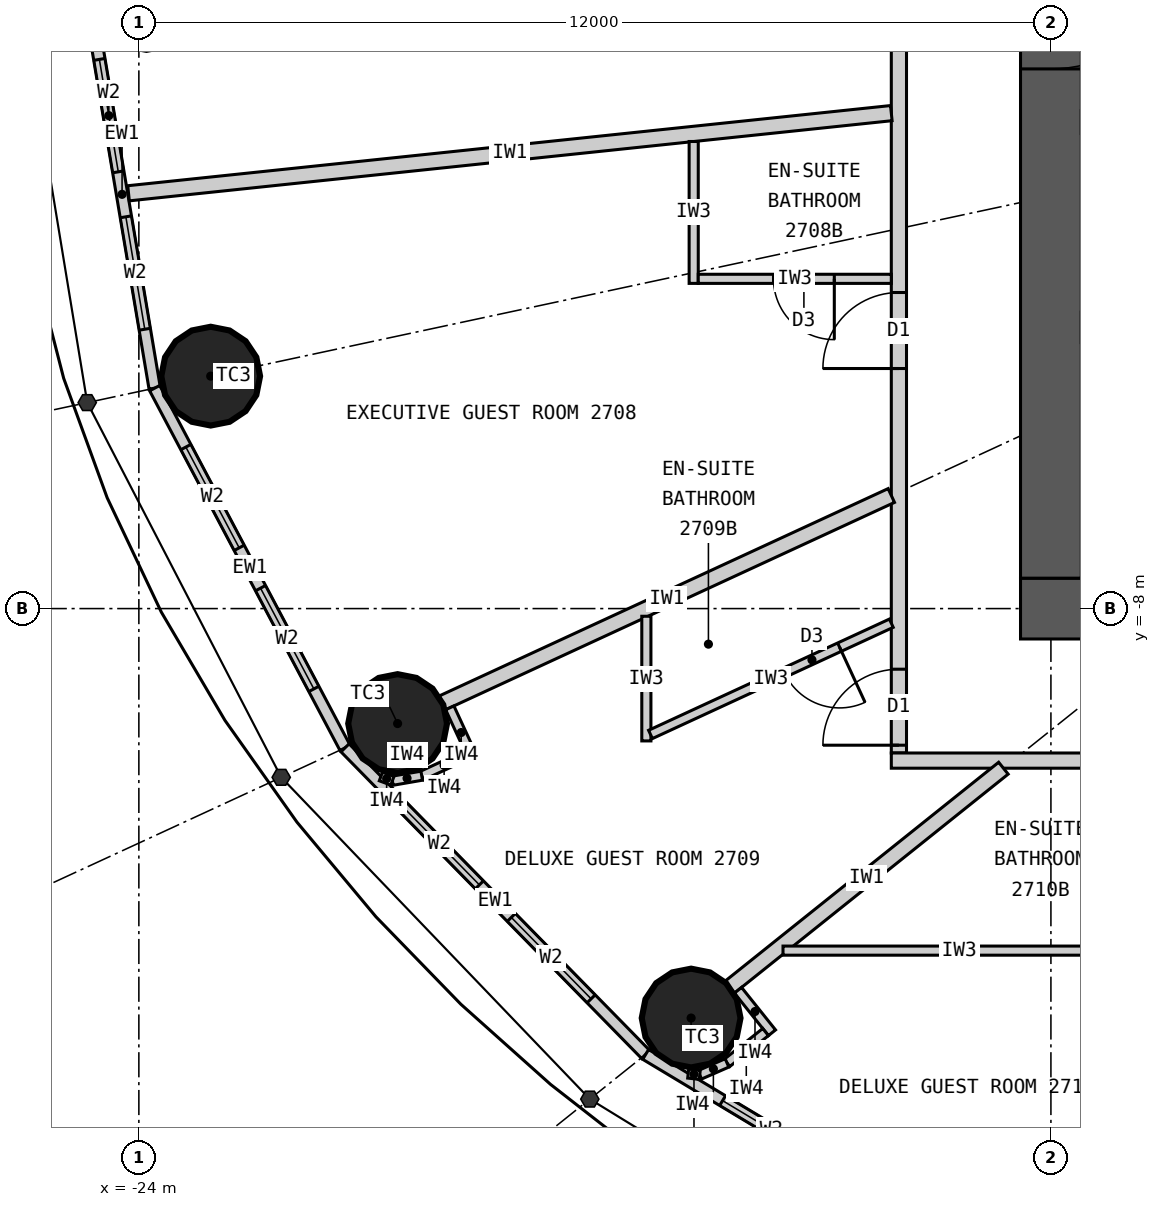
"""IFC4 building model, lengths in metres.
Left out: names, types, materials, properties, quantities, classifications, styles, units other than length and angle.
Written with IfcOpenShell. Run it as: python <this file> out.ifc"""

import sys

from ifc_helpers import new_model, si_unit, direction, frame, frame_2d, origin, origin_2d, place, context, subcontext, project, spatial, rectangle, circle, extrude, element, fill, save


model = new_model("IFC4")
c1 = context("Model", 3, precision=1e-05, world=origin(), true_north=direction((0.0, 1.0)))
c2 = subcontext(c1, "Body", "Model", "MODEL_VIEW")
j1 = project(units=[si_unit("LENGTHUNIT", "METRE"), si_unit("PLANEANGLEUNIT", "RADIAN")], contexts=[c1])
p1 = place(None, origin())
s1 = spatial("IfcSite", under=j1, at=p1, CompositionType="ELEMENT")
p2 = place(p1, origin())
s2 = spatial("IfcBuilding", under=s1, at=p2, CompositionType="ELEMENT")
p3 = place(p2, frame((0.0, 0.0, 108.9)))
s3 = spatial("IfcBuildingStorey", under=s2, at=p3, CompositionType="ELEMENT", Elevation=108.9)
for number, where, z_axis, x_axis in (
    (1, (-23.055, -4.942, 0.0), (0.0, 0.0, 1.0), (1.0, 0.0, 0.0)),
    (2, (-20.596, -9.513, 0.0), (0.0, 0.0, 1.0), (1.0, 0.0, 0.0)),
    (3, (-16.734, -13.387, 0.0), (0.0, 0.0, 1.0), (1.0, 0.0, 0.0)),
):
    element("IfcColumn", number, at=place(p3, frame(where, z_axis=z_axis, x_axis=x_axis)), inside=s3, PredefinedType="COLUMN", context=c2, shape_type="SweptSolid", body=[
        extrude(circle(Radius=0.65, at=origin_2d()), origin(), (0.0, 0.0, 1.0), 3.3),
    ])
p4 = place(p3, frame((12.4, -8.0, 0.0), z_axis=(0.0, 0.0, 1.0), x_axis=(-1.0, 0.0, 0.0)))
e4 = element("IfcWall", 4, at=p4, inside=s3, PredefinedType="SHEAR", context=c2, shape_type="SweptSolid", body=[
    extrude(rectangle(XDim=24.8, YDim=0.8, at=frame_2d((12.4, 0.0))), origin(), (0.0, 0.0, 1.0), 3.3),
])
p5 = place(p4, frame((11.1, 0.0, 0.0)))
e5 = element("IfcOpeningElement", 5, at=p5, cuts=e4, PredefinedType="OPENING", context=c2, shape_type="SweptSolid", body=[
    extrude(rectangle(XDim=1.2, YDim=2.2, at=frame_2d((0.6, 1.1))), frame((0.0, 0.41, 0.0), z_axis=(0.0, -1.0, 0.0), x_axis=(1.0, 0.0, 0.0)), (0.0, 0.0, 1.0), 0.82),
])
p6 = place(p4, frame((18.7, 0.0, 0.0)))
e6 = element("IfcOpeningElement", 6, at=p6, cuts=e4, PredefinedType="OPENING", context=c2, shape_type="SweptSolid", body=[
    extrude(rectangle(XDim=0.9, YDim=2.2, at=frame_2d((0.45, 1.1))), frame((0.0, 0.41, 0.0), z_axis=(0.0, -1.0, 0.0), x_axis=(1.0, 0.0, 0.0)), (0.0, 0.0, 1.0), 0.82),
])
p7 = place(p3, frame((-12.0, 7.6, 0.0), z_axis=(0.0, 0.0, 1.0), x_axis=(0.0, -1.0, 0.0)))
e7 = element("IfcWall", 7, at=p7, inside=s3, PredefinedType="SHEAR", context=c2, shape_type="SweptSolid", body=[
    extrude(rectangle(XDim=15.2, YDim=0.8, at=frame_2d((7.6, 0.0))), origin(), (0.0, 0.0, 1.0), 3.3),
])
p8 = place(p7, frame((6.7, 0.0, 0.0)))
e8 = element("IfcOpeningElement", 8, at=p8, cuts=e7, PredefinedType="OPENING", context=c2, shape_type="SweptSolid", body=[
    extrude(rectangle(XDim=1.8, YDim=2.2, at=frame_2d((0.9, 1.1))), frame((0.0, 0.41, 0.0), z_axis=(0.0, -1.0, 0.0), x_axis=(1.0, 0.0, 0.0)), (0.0, 0.0, 1.0), 0.82),
])
p9 = place(p3, frame((-24.65, 0.0, 0.0), z_axis=(0.0, 0.0, 1.0), x_axis=(0.165883894218, -0.986145290329, 0.0)))
e9 = element("IfcWall", 9, at=p9, inside=s3, PredefinedType="ELEMENTEDWALL", context=c2, shape_type="SweptSolid", body=[
    extrude(rectangle(XDim=5.172, YDim=0.15, at=frame_2d((2.586, 0.0))), origin(), (0.0, 0.0, 1.0), 3.12),
])
p10 = place(p9, frame((0.786, 0.0, 0.9)))
e10 = element("IfcOpeningElement", 10, at=p10, cuts=e9, PredefinedType="OPENING", context=c2, shape_type="SweptSolid", body=[
    extrude(rectangle(XDim=1.5, YDim=1.9, at=frame_2d((0.75, 0.95))), frame((0.0, 0.085, 0.0), z_axis=(0.0, -1.0, 0.0), x_axis=(1.0, 0.0, 0.0)), (0.0, 0.0, 1.0), 0.17),
])
p11 = place(p9, frame((2.886, 0.0, 0.9)))
e11 = element("IfcOpeningElement", 11, at=p11, cuts=e9, PredefinedType="OPENING", context=c2, shape_type="SweptSolid", body=[
    extrude(rectangle(XDim=1.5, YDim=1.9, at=frame_2d((0.75, 0.95))), frame((0.0, 0.085, 0.0), z_axis=(0.0, -1.0, 0.0), x_axis=(1.0, 0.0, 0.0)), (0.0, 0.0, 1.0), 0.17),
])
p12 = place(p3, frame((-23.792, -5.1, 0.0), z_axis=(0.0, 0.0, 1.0), x_axis=(0.467814388454, -0.883826735257, 0.0)))
e12 = element("IfcWall", 12, at=p12, inside=s3, PredefinedType="ELEMENTEDWALL", context=c2, shape_type="SweptSolid", body=[
    extrude(rectangle(XDim=5.354, YDim=0.15, at=frame_2d((2.677, 0.0))), origin(), (0.0, 0.0, 1.0), 3.12),
])
p13 = place(p12, frame((0.877, 0.0, 0.9)))
e13 = element("IfcOpeningElement", 13, at=p13, cuts=e12, PredefinedType="OPENING", context=c2, shape_type="SweptSolid", body=[
    extrude(rectangle(XDim=1.5, YDim=1.9, at=frame_2d((0.75, 0.95))), frame((0.0, 0.085, 0.0), z_axis=(0.0, -1.0, 0.0), x_axis=(1.0, 0.0, 0.0)), (0.0, 0.0, 1.0), 0.17),
])
p14 = place(p12, frame((2.977, 0.0, 0.9)))
e14 = element("IfcOpeningElement", 14, at=p14, cuts=e12, PredefinedType="OPENING", context=c2, shape_type="SweptSolid", body=[
    extrude(rectangle(XDim=1.5, YDim=1.9, at=frame_2d((0.75, 0.95))), frame((0.0, 0.085, 0.0), z_axis=(0.0, -1.0, 0.0), x_axis=(1.0, 0.0, 0.0)), (0.0, 0.0, 1.0), 0.17),
])
p15 = place(p3, frame((-21.287, -9.832, 0.0), z_axis=(0.0, 0.0, 1.0), x_axis=(0.700136650834, -0.714008872605, 0.0)))
e15 = element("IfcWall", 15, at=p15, inside=s3, PredefinedType="ELEMENTEDWALL", context=c2, shape_type="SweptSolid", body=[
    extrude(rectangle(XDim=5.649, YDim=0.15, at=frame_2d((2.825, 0.0))), origin(), (0.0, 0.0, 1.0), 3.12),
])
p16 = place(p15, frame((1.025, 0.0, 0.9)))
e16 = element("IfcOpeningElement", 16, at=p16, cuts=e15, PredefinedType="OPENING", context=c2, shape_type="SweptSolid", body=[
    extrude(rectangle(XDim=1.5, YDim=1.9, at=frame_2d((0.75, 0.95))), frame((0.0, 0.085, 0.0), z_axis=(0.0, -1.0, 0.0), x_axis=(1.0, 0.0, 0.0)), (0.0, 0.0, 1.0), 0.17),
])
p17 = place(p15, frame((3.125, 0.0, 0.9)))
e17 = element("IfcOpeningElement", 17, at=p17, cuts=e15, PredefinedType="OPENING", context=c2, shape_type="SweptSolid", body=[
    extrude(rectangle(XDim=1.5, YDim=1.9, at=frame_2d((0.75, 0.95))), frame((0.0, 0.085, 0.0), z_axis=(0.0, -1.0, 0.0), x_axis=(1.0, 0.0, 0.0)), (0.0, 0.0, 1.0), 0.17),
])
p18 = place(p3, frame((-17.332, -13.866, 0.0), z_axis=(0.0, 0.0, 1.0), x_axis=(0.857308573723, -0.514802884044, 0.0)))
e18 = element("IfcWall", 18, at=p18, inside=s3, PredefinedType="ELEMENTEDWALL", context=c2, shape_type="SweptSolid", body=[
    extrude(rectangle(XDim=5.961, YDim=0.15, at=frame_2d((2.98, 0.0))), origin(), (0.0, 0.0, 1.0), 3.12),
])
p19 = place(p18, frame((1.181, 0.0, 0.9)))
e19 = element("IfcOpeningElement", 19, at=p19, cuts=e18, PredefinedType="OPENING", context=c2, shape_type="SweptSolid", body=[
    extrude(rectangle(XDim=1.5, YDim=1.9, at=frame_2d((0.75, 0.95))), frame((0.0, 0.085, 0.0), z_axis=(0.0, -1.0, 0.0), x_axis=(1.0, 0.0, 0.0)), (0.0, 0.0, 1.0), 0.17),
])
p20 = place(p18, frame((3.281, 0.0, 0.9)))
e20 = element("IfcOpeningElement", 20, at=p20, cuts=e18, PredefinedType="OPENING", context=c2, shape_type="SweptSolid", body=[
    extrude(rectangle(XDim=1.5, YDim=1.9, at=frame_2d((0.75, 0.95))), frame((0.0, 0.085, 0.0), z_axis=(0.0, -1.0, 0.0), x_axis=(1.0, 0.0, 0.0)), (0.0, 0.0, 1.0), 0.17),
])
p21 = place(p3, frame((-14.0, 9.9, 0.0), z_axis=(0.0, 0.0, 1.0), x_axis=(0.0, -1.0, 0.0)))
e21 = element("IfcWall", 21, at=p21, inside=s3, PredefinedType="PARTITIONING", context=c2, shape_type="SweptSolid", body=[
    extrude(rectangle(XDim=19.8, YDim=0.2, at=frame_2d((9.9, 0.0))), origin(), (0.0, 0.0, 1.0), 3.12),
])
p22 = place(p21, frame((3.622, 0.0, 0.0)))
e22 = element("IfcOpeningElement", 22, at=p22, cuts=e21, PredefinedType="OPENING", context=c2, shape_type="SweptSolid", body=[
    extrude(rectangle(XDim=1.0, YDim=2.2, at=frame_2d((0.5, 1.1))), frame((0.0, 0.11, 0.0), z_axis=(0.0, -1.0, 0.0), x_axis=(1.0, 0.0, 0.0)), (0.0, 0.0, 1.0), 0.22),
])
p23 = place(p21, frame((9.238, 0.0, 0.0)))
e23 = element("IfcOpeningElement", 23, at=p23, cuts=e21, PredefinedType="OPENING", context=c2, shape_type="SweptSolid", body=[
    extrude(rectangle(XDim=1.0, YDim=2.2, at=frame_2d((0.5, 1.1))), frame((0.0, 0.11, 0.0), z_axis=(0.0, -1.0, 0.0), x_axis=(1.0, 0.0, 0.0)), (0.0, 0.0, 1.0), 0.22),
])
p24 = place(p21, frame((13.742, 0.0, 0.0)))
e24 = element("IfcOpeningElement", 24, at=p24, cuts=e21, PredefinedType="OPENING", context=c2, shape_type="SweptSolid", body=[
    extrude(rectangle(XDim=1.0, YDim=2.2, at=frame_2d((0.5, 1.1))), frame((0.0, 0.11, 0.0), z_axis=(0.0, -1.0, 0.0), x_axis=(1.0, 0.0, 0.0)), (0.0, 0.0, 1.0), 0.22),
])
p25 = place(p21, frame((18.698, 0.0, 0.0)))
e25 = element("IfcOpeningElement", 25, at=p25, cuts=e21, PredefinedType="OPENING", context=c2, shape_type="SweptSolid", body=[
    extrude(rectangle(XDim=1.0, YDim=2.2, at=frame_2d((0.5, 1.1))), frame((0.0, 0.11, 0.0), z_axis=(0.0, -1.0, 0.0), x_axis=(1.0, 0.0, 0.0)), (0.0, 0.0, 1.0), 0.22),
])
p26 = place(p3, frame((-3.283, -10.0, 0.0), z_axis=(0.0, 0.0, 1.0), x_axis=(-1.0, 0.0, 0.0)))
e26 = element("IfcWall", 26, at=p26, inside=s3, PredefinedType="PARTITIONING", context=c2, shape_type="SweptSolid", body=[
    extrude(rectangle(XDim=10.817, YDim=0.2, at=frame_2d((5.409, 0.0))), origin(), (0.0, 0.0, 1.0), 3.12),
])
p27 = place(p26, frame((6.482, 0.0, 0.0)))
e27 = element("IfcOpeningElement", 27, at=p27, cuts=e26, PredefinedType="OPENING", context=c2, shape_type="SweptSolid", body=[
    extrude(rectangle(XDim=1.0, YDim=2.2, at=frame_2d((0.5, 1.1))), frame((0.0, 0.11, 0.0), z_axis=(0.0, -1.0, 0.0), x_axis=(1.0, 0.0, 0.0)), (0.0, 0.0, 1.0), 0.22),
])
p28 = place(p3, frame((-14.1, -1.482, 0.0), z_axis=(0.0, 0.0, 1.0), x_axis=(-0.994523202615, -0.104516024894, 0.0)))
e28 = element("IfcWall", 28, at=p28, inside=s3, PredefinedType="PARTITIONING", context=c2, shape_type="SweptSolid", body=[
    extrude(rectangle(XDim=10.091, YDim=0.2, at=frame_2d((5.045, 0.0))), origin(), (0.0, 0.0, 1.0), 2.47),
])
p29 = place(p3, frame((-14.1, -6.512, 0.0), z_axis=(0.0, 0.0, 1.0), x_axis=(-0.907833019998, -0.419331858797, 0.0)))
e29 = element("IfcWall", 29, at=p29, inside=s3, PredefinedType="PARTITIONING", context=c2, shape_type="SweptSolid", body=[
    extrude(rectangle(XDim=6.505, YDim=0.2, at=frame_2d((3.252, 0.0))), origin(), (0.0, 0.0, 1.0), 2.27),
])
p30 = place(p3, frame((-12.625, -10.1, 0.0), z_axis=(0.0, 0.0, 1.0), x_axis=(-0.780863644897, -0.624701503182, 0.0)))
e30 = element("IfcWall", 30, at=p30, inside=s3, PredefinedType="PARTITIONING", context=c2, shape_type="SweptSolid", body=[
    extrude(rectangle(XDim=4.612, YDim=0.2, at=frame_2d((2.306, 0.0))), origin(), (0.0, 0.0, 1.0), 2.37),
])
p31 = place(p3, frame((-16.7, -1.855, 0.0), z_axis=(0.0, 0.0, 1.0), x_axis=(0.0, -1.0, 0.0)))
e31 = element("IfcWall", 31, at=p31, inside=s3, PredefinedType="PARTITIONING", context=c2, shape_type="SweptSolid", body=[
    extrude(rectangle(XDim=1.867, YDim=0.12, at=frame_2d((0.933, 0.0))), origin(), (0.0, 0.0, 1.0), 3.12),
])
p32 = place(p3, frame((-14.1, -3.662, 0.0), z_axis=(0.0, 0.0, 1.0), x_axis=(-1.0, 0.0, 0.0)))
e32 = element("IfcWall", 32, at=p32, inside=s3, PredefinedType="PARTITIONING", context=c2, shape_type="SweptSolid", body=[
    extrude(rectangle(XDim=2.54, YDim=0.12, at=frame_2d((1.27, 0.0))), origin(), (0.0, 0.0, 1.0), 2.37),
])
p33 = place(p32, frame((0.75, 0.0, 0.0)))
e33 = element("IfcOpeningElement", 33, at=p33, cuts=e32, PredefinedType="OPENING", context=c2, shape_type="SweptSolid", body=[
    extrude(rectangle(XDim=0.8, YDim=2.1, at=frame_2d((0.4, 1.05))), frame((0.0, 0.07, 0.0), z_axis=(0.0, -1.0, 0.0), x_axis=(1.0, 0.0, 0.0)), (0.0, 0.0, 1.0), 0.14),
])
p34 = place(p3, frame((-17.323, -8.101, 0.0), z_axis=(0.0, 0.0, 1.0), x_axis=(0.0, -1.0, 0.0)))
e34 = element("IfcWall", 34, at=p34, inside=s3, PredefinedType="PARTITIONING", context=c2, shape_type="SweptSolid", body=[
    extrude(rectangle(XDim=1.64, YDim=0.12, at=frame_2d((0.82, 0.0))), origin(), (0.0, 0.0, 1.0), 3.12),
])
p35 = place(p3, frame((-14.1, -8.193, 0.0), z_axis=(0.0, 0.0, 1.0), x_axis=(-0.907836493557, -0.419324338628, 0.0)))
e35 = element("IfcWall", 35, at=p35, inside=s3, PredefinedType="PARTITIONING", context=c2, shape_type="SweptSolid", body=[
    extrude(rectangle(XDim=3.49, YDim=0.12, at=frame_2d((1.745, 0.0))), origin(), (0.0, 0.0, 1.0), 3.12),
])
p36 = place(p35, frame((0.75, 0.0, 0.0)))
e36 = element("IfcOpeningElement", 36, at=p36, cuts=e35, PredefinedType="OPENING", context=c2, shape_type="SweptSolid", body=[
    extrude(rectangle(XDim=0.8, YDim=2.1, at=frame_2d((0.4, 1.05))), frame((0.0, 0.07, 0.0), z_axis=(0.0, -1.0, 0.0), x_axis=(1.0, 0.0, 0.0)), (0.0, 0.0, 1.0), 0.14),
])
p37 = place(p3, frame((-15.525, -12.5, 0.0), z_axis=(0.0, 0.0, 1.0), x_axis=(1.0, 0.0, 0.0)))
e37 = element("IfcWall", 37, at=p37, inside=s3, PredefinedType="PARTITIONING", context=c2, shape_type="SweptSolid", body=[
    extrude(rectangle(XDim=4.64, YDim=0.12, at=frame_2d((2.32, 0.0))), origin(), (0.0, 0.0, 1.0), 3.12),
])
p38 = place(p3, frame((-19.909, -9.306, 0.0), z_axis=(0.0, 0.0, 1.0), x_axis=(0.419296148934, -0.90784951368, 0.0)))
e38 = element("IfcWall", 38, at=p38, inside=s3, PredefinedType="PARTITIONING", context=c2, shape_type="SweptSolid", body=[
    extrude(rectangle(XDim=0.716, YDim=0.12, at=frame_2d((0.358, 0.0))), origin(), (0.0, 0.0, 1.0), 3.12),
])
p39 = place(p3, frame((-19.689, -9.926, 0.0), z_axis=(0.0, 0.0, 1.0), x_axis=(-0.907893409272, -0.419201094227, 0.0)))
e39 = element("IfcWall", 39, at=p39, inside=s3, PredefinedType="PARTITIONING", context=c2, shape_type="SweptSolid", body=[
    extrude(rectangle(XDim=0.65, YDim=0.12, at=frame_2d((0.325, 0.0))), origin(), (0.0, 0.0, 1.0), 3.12),
])
p40 = place(p3, frame((-20.279, -10.199, 0.0), z_axis=(0.0, 0.0, 1.0), x_axis=(-0.985380740712, -0.170366651181, 0.0)))
e40 = element("IfcWall", 40, at=p40, inside=s3, PredefinedType="PARTITIONING", context=c2, shape_type="SweptSolid", body=[
    extrude(rectangle(XDim=0.391, YDim=0.12, at=frame_2d((0.196, 0.0))), origin(), (0.0, 0.0, 1.0), 3.12),
])
p41 = place(p3, frame((-20.664, -10.265, 0.0), z_axis=(0.0, 0.0, 1.0), x_axis=(-0.938058651481, 0.346476501918, 0.0)))
e41 = element("IfcWall", 41, at=p41, inside=s3, PredefinedType="PARTITIONING", context=c2, shape_type="SweptSolid", body=[
    extrude(rectangle(XDim=0.161, YDim=0.12, at=frame_2d((0.081, 0.0))), origin(), (0.0, 0.0, 1.0), 3.12),
])
p42 = place(p3, frame((-16.117, -13.022, 0.0), z_axis=(0.0, 0.0, 1.0), x_axis=(0.62465344249, -0.780902091677, 0.0)))
e42 = element("IfcWall", 42, at=p42, inside=s3, PredefinedType="PARTITIONING", context=c2, shape_type="SweptSolid", body=[
    extrude(rectangle(XDim=0.716, YDim=0.12, at=frame_2d((0.358, 0.0))), origin(), (0.0, 0.0, 1.0), 3.12),
])
p43 = place(p3, frame((-15.754, -13.571, 0.0), z_axis=(0.0, 0.0, 1.0), x_axis=(-0.780905453553, -0.624649239663, 0.0)))
e43 = element("IfcWall", 43, at=p43, inside=s3, PredefinedType="PARTITIONING", context=c2, shape_type="SweptSolid", body=[
    extrude(rectangle(XDim=0.65, YDim=0.12, at=frame_2d((0.325, 0.0))), origin(), (0.0, 0.0, 1.0), 3.12),
])
p44 = place(p3, frame((-16.262, -13.977, 0.0), z_axis=(0.0, 0.0, 1.0), x_axis=(-0.915985403703, -0.401211590314, 0.0)))
e44 = element("IfcWall", 44, at=p44, inside=s3, PredefinedType="PARTITIONING", context=c2, shape_type="SweptSolid", body=[
    extrude(rectangle(XDim=0.391, YDim=0.12, at=frame_2d((0.196, 0.0))), origin(), (0.0, 0.0, 1.0), 3.12),
])
p45 = place(p3, frame((-16.62, -14.134, 0.0), z_axis=(0.0, 0.0, 1.0), x_axis=(-0.993941871493, 0.109907033867, 0.0)))
e45 = element("IfcWall", 45, at=p45, inside=s3, PredefinedType="PARTITIONING", context=c2, shape_type="SweptSolid", body=[
    extrude(rectangle(XDim=0.153, YDim=0.12, at=frame_2d((0.077, 0.0))), origin(), (0.0, 0.0, 1.0), 3.12),
])
p46 = place(p10, origin())
e46 = element("IfcWindow", 46, at=p46, inside=s3, PartitioningType="SINGLE_PANEL", PredefinedType="WINDOW", context=c2, shape_type="SweptSolid", body=[
    extrude(rectangle(XDim=1.5, YDim=1.9, at=frame_2d((0.75, 0.95))), frame((0.0, 0.03, 0.0), z_axis=(0.0, -1.0, 0.0), x_axis=(1.0, 0.0, 0.0)), (0.0, 0.0, 1.0), 0.06),
])
fill(e10, e46)
p47 = place(p11, origin())
e47 = element("IfcWindow", 47, at=p47, inside=s3, PartitioningType="SINGLE_PANEL", PredefinedType="WINDOW", context=c2, shape_type="SweptSolid", body=[
    extrude(rectangle(XDim=1.5, YDim=1.9, at=frame_2d((0.75, 0.95))), frame((0.0, 0.03, 0.0), z_axis=(0.0, -1.0, 0.0), x_axis=(1.0, 0.0, 0.0)), (0.0, 0.0, 1.0), 0.06),
])
fill(e11, e47)
p48 = place(p13, origin())
e48 = element("IfcWindow", 48, at=p48, inside=s3, PartitioningType="SINGLE_PANEL", PredefinedType="WINDOW", context=c2, shape_type="SweptSolid", body=[
    extrude(rectangle(XDim=1.5, YDim=1.9, at=frame_2d((0.75, 0.95))), frame((0.0, 0.03, 0.0), z_axis=(0.0, -1.0, 0.0), x_axis=(1.0, 0.0, 0.0)), (0.0, 0.0, 1.0), 0.06),
])
fill(e13, e48)
p49 = place(p14, origin())
e49 = element("IfcWindow", 49, at=p49, inside=s3, PartitioningType="SINGLE_PANEL", PredefinedType="WINDOW", context=c2, shape_type="SweptSolid", body=[
    extrude(rectangle(XDim=1.5, YDim=1.9, at=frame_2d((0.75, 0.95))), frame((0.0, 0.03, 0.0), z_axis=(0.0, -1.0, 0.0), x_axis=(1.0, 0.0, 0.0)), (0.0, 0.0, 1.0), 0.06),
])
fill(e14, e49)
p50 = place(p16, origin())
e50 = element("IfcWindow", 50, at=p50, inside=s3, PartitioningType="SINGLE_PANEL", PredefinedType="WINDOW", context=c2, shape_type="SweptSolid", body=[
    extrude(rectangle(XDim=1.5, YDim=1.9, at=frame_2d((0.75, 0.95))), frame((0.0, 0.03, 0.0), z_axis=(0.0, -1.0, 0.0), x_axis=(1.0, 0.0, 0.0)), (0.0, 0.0, 1.0), 0.06),
])
fill(e16, e50)
p51 = place(p17, origin())
e51 = element("IfcWindow", 51, at=p51, inside=s3, PartitioningType="SINGLE_PANEL", PredefinedType="WINDOW", context=c2, shape_type="SweptSolid", body=[
    extrude(rectangle(XDim=1.5, YDim=1.9, at=frame_2d((0.75, 0.95))), frame((0.0, 0.03, 0.0), z_axis=(0.0, -1.0, 0.0), x_axis=(1.0, 0.0, 0.0)), (0.0, 0.0, 1.0), 0.06),
])
fill(e17, e51)
p52 = place(p19, origin())
e52 = element("IfcWindow", 52, at=p52, inside=s3, PartitioningType="SINGLE_PANEL", PredefinedType="WINDOW", context=c2, shape_type="SweptSolid", body=[
    extrude(rectangle(XDim=1.5, YDim=1.9, at=frame_2d((0.75, 0.95))), frame((0.0, 0.03, 0.0), z_axis=(0.0, -1.0, 0.0), x_axis=(1.0, 0.0, 0.0)), (0.0, 0.0, 1.0), 0.06),
])
fill(e19, e52)
p53 = place(p33, origin())
e53 = element("IfcDoor", 53, at=p53, inside=s3, OperationType="SINGLE_SWING_LEFT", PredefinedType="DOOR", context=c2, shape_type="SweptSolid", body=[
    extrude(rectangle(XDim=0.8, YDim=2.1, at=frame_2d((0.4, 1.05))), frame((0.0, 0.025, 0.0), z_axis=(0.0, -1.0, 0.0), x_axis=(1.0, 0.0, 0.0)), (0.0, 0.0, 1.0), 0.05),
])
fill(e33, e53)
p54 = place(p24, origin())
e54 = element("IfcDoor", 54, at=p54, inside=s3, OperationType="SINGLE_SWING_RIGHT", PredefinedType="DOOR", context=c2, shape_type="SweptSolid", body=[
    extrude(rectangle(XDim=1.0, YDim=2.2, at=frame_2d((0.5, 1.1))), frame((0.0, 0.025, 0.0), z_axis=(0.0, -1.0, 0.0), x_axis=(1.0, 0.0, 0.0)), (0.0, 0.0, 1.0), 0.05),
])
fill(e24, e54)
p55 = place(p36, origin())
e55 = element("IfcDoor", 55, at=p55, inside=s3, OperationType="SINGLE_SWING_LEFT", PredefinedType="DOOR", context=c2, shape_type="SweptSolid", body=[
    extrude(rectangle(XDim=0.8, YDim=2.1, at=frame_2d((0.4, 1.05))), frame((0.0, 0.025, 0.0), z_axis=(0.0, -1.0, 0.0), x_axis=(1.0, 0.0, 0.0)), (0.0, 0.0, 1.0), 0.05),
])
fill(e36, e55)
p56 = place(p25, origin())
e56 = element("IfcDoor", 56, at=p56, inside=s3, OperationType="SINGLE_SWING_RIGHT", PredefinedType="DOOR", context=c2, shape_type="SweptSolid", body=[
    extrude(rectangle(XDim=1.0, YDim=2.2, at=frame_2d((0.5, 1.1))), frame((0.0, 0.025, 0.0), z_axis=(0.0, -1.0, 0.0), x_axis=(1.0, 0.0, 0.0)), (0.0, 0.0, 1.0), 0.05),
])
fill(e25, e56)
p57 = place(p8, origin())
e57 = element("IfcDoor", 57, at=p57, inside=s3, OperationType="DOUBLE_DOOR_DOUBLE_SWING", PredefinedType="DOOR", context=c2, shape_type="SweptSolid", body=[
    extrude(rectangle(XDim=1.8, YDim=2.2, at=frame_2d((0.9, 1.1))), frame((0.0, 0.025, 0.0), z_axis=(0.0, -1.0, 0.0), x_axis=(1.0, 0.0, 0.0)), (0.0, 0.0, 1.0), 0.05),
])
fill(e8, e57)
save(model, sys.argv[1])
